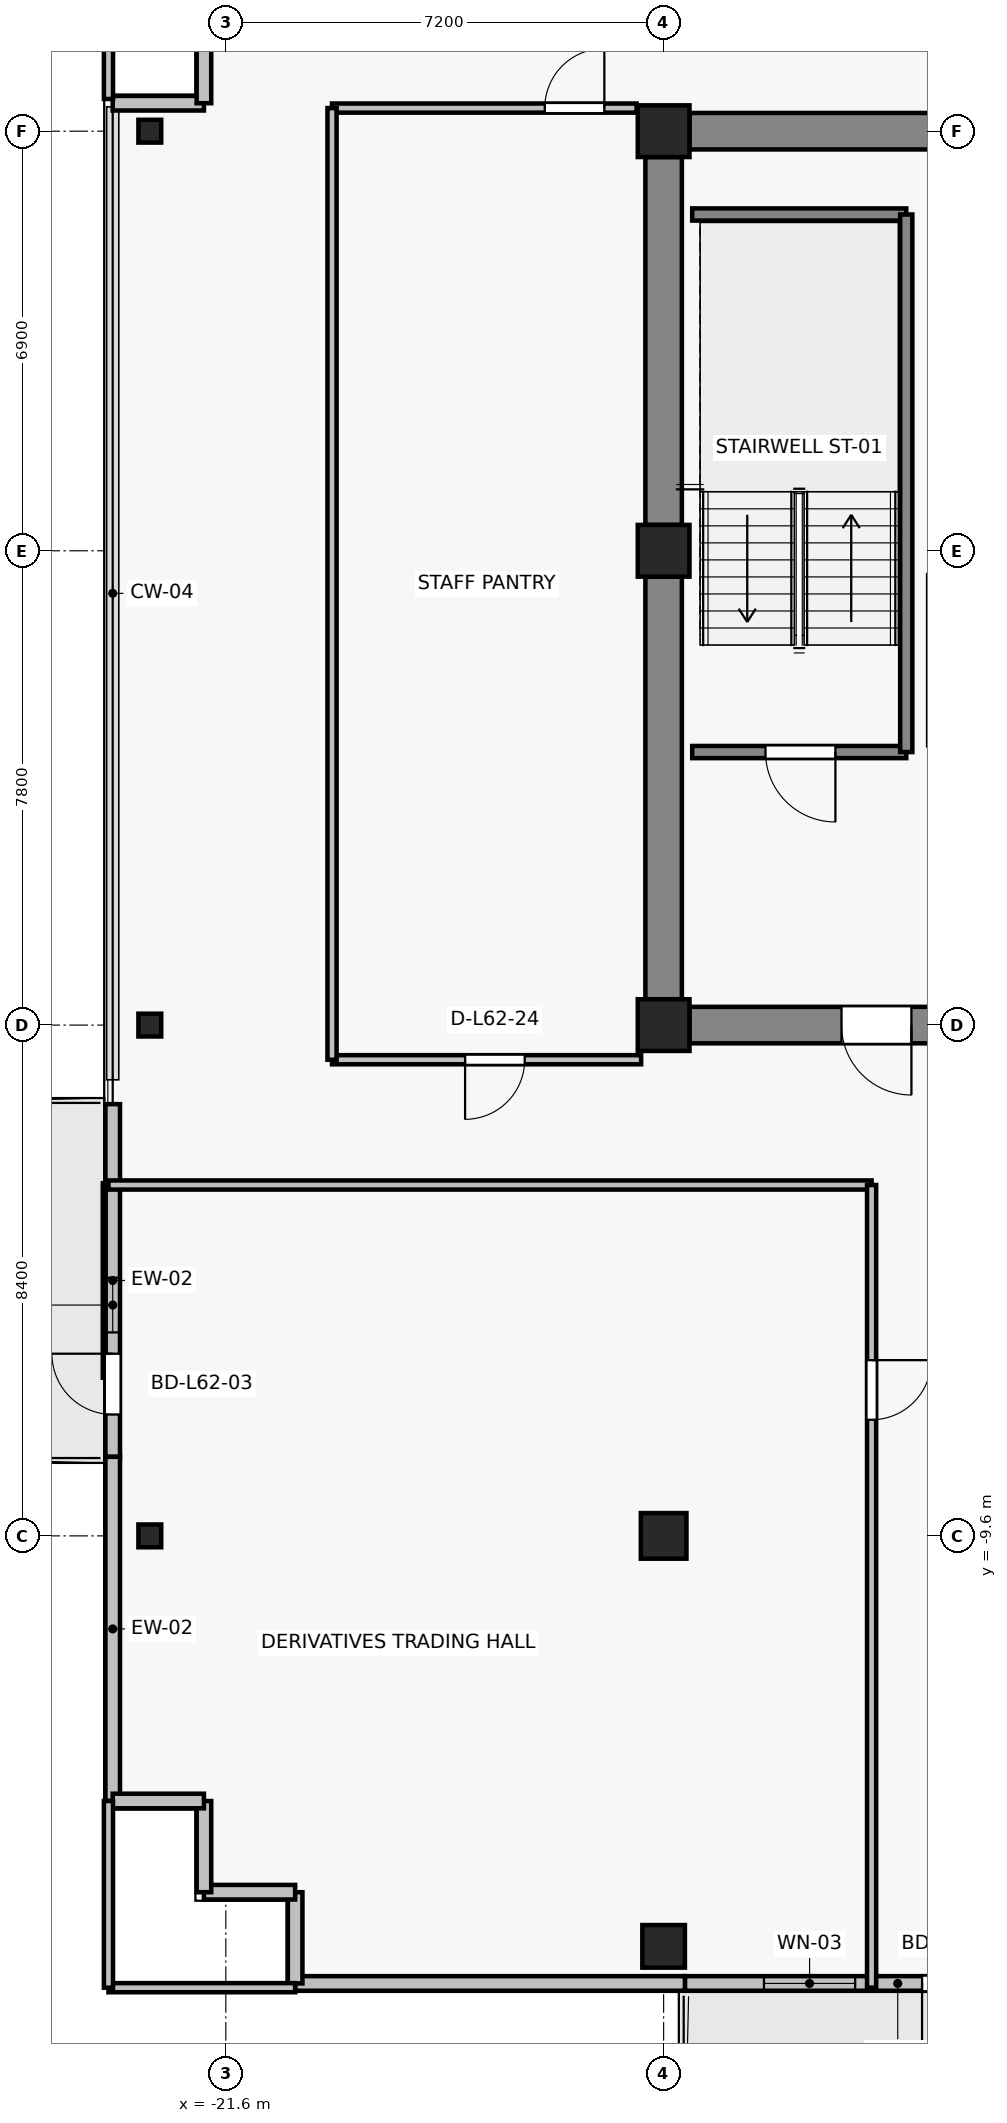
"""IFC4 building model, lengths in metres.
Left out: names, types, materials, properties, quantities, classifications, styles, units other than length and angle.
Written with IfcOpenShell. Run it as: python <this file> out.ifc"""

import sys

from ifc_helpers import new_model, si_unit, direction, frame, frame_2d, origin, origin_2d, place, context, subcontext, project, spatial, rectangle, i_section, extrude, source, transform, mapped, element, fill, save


model = new_model("IFC4")
c1 = context("Model", 3, precision=1e-05, world=origin(), true_north=direction((0.0, 1.0)))
c2 = subcontext(c1, "Body", "Model", "MODEL_VIEW")
j1 = project(units=[si_unit("LENGTHUNIT", "METRE"), si_unit("PLANEANGLEUNIT", "RADIAN")], contexts=[c1])
p1 = place(None, origin())
s1 = spatial("IfcSite", under=j1, at=p1, CompositionType="ELEMENT")
p2 = place(p1, origin())
s2 = spatial("IfcBuilding", under=s1, at=p2, CompositionType="ELEMENT")
p3 = place(p2, frame((0.0, 0.0, 222.1)))
s3 = spatial("IfcBuildingStorey", under=s2, at=p3, CompositionType="ELEMENT", Elevation=222.1)
for number, where, z_axis, x_axis in (
    (1, (-14.4, -1.2, 0.0), (0.0, 0.0, 1.0), (1.0, 0.0, 0.0)),
    (2, (-14.4, 6.6, 0.0), (0.0, 0.0, 1.0), (1.0, 0.0, 0.0)),
    (3, (-14.4, 13.5, 0.0), (0.0, 0.0, 1.0), (1.0, 0.0, 0.0)),
):
    element("IfcColumn", number, at=place(p3, frame(where, z_axis=z_axis, x_axis=x_axis)), inside=s3, PredefinedType="COLUMN", context=c2, shape_type="SweptSolid", body=[
        extrude(rectangle(XDim=0.85, YDim=0.85, at=origin_2d()), origin(), (0.0, 0.0, 1.0), 3.3),
    ])
p4 = place(p3, frame((-14.4, -9.6, 0.0), z_axis=(0.0, 0.0, 1.0), x_axis=(1.0, 0.0, 0.0)))
e4 = element("IfcColumn", 4, at=p4, inside=s3, PredefinedType="COLUMN", context=c2, shape_type="SweptSolid", body=[
    extrude(rectangle(XDim=0.75, YDim=0.75, at=origin_2d()), origin(), (0.0, 0.0, 1.0), 3.3),
])
p5 = place(p3, frame((-14.4, -16.35, 0.0), z_axis=(0.0, 0.0, 1.0), x_axis=(1.0, 0.0, 0.0)))
e5 = element("IfcColumn", 5, at=p5, inside=s3, PredefinedType="COLUMN", context=c2, shape_type="SweptSolid", body=[
    extrude(rectangle(XDim=0.7, YDim=0.7, at=origin_2d()), origin(), (0.0, 0.0, 1.0), 3.3),
])
for number, where, z_axis, x_axis in (
    (6, (-22.85, -9.6, 0.0), (0.0, 0.0, 1.0), (1.0, 0.0, 0.0)),
    (7, (-22.85, -1.2, 0.0), (0.0, 0.0, 1.0), (1.0, 0.0, 0.0)),
    (8, (-22.85, 13.5, 0.0), (0.0, 0.0, 1.0), (1.0, 0.0, 0.0)),
):
    element("IfcColumn", number, at=place(p3, frame(where, z_axis=z_axis, x_axis=x_axis)), inside=s3, PredefinedType="COLUMN", context=c2, shape_type="SweptSolid", body=[
        extrude(i_section(OverallWidth=0.375, OverallDepth=0.375, WebThickness=0.017, FlangeThickness=0.027, FilletRadius=0.015, at=origin_2d()), origin(), (0.0, 0.0, 1.0), 3.3),
    ])
p6 = place(p3, frame((-13.975, 13.5, 0.0), z_axis=(0.0, 0.0, 1.0), x_axis=(1.0, 0.0, 0.0)))
e9 = element("IfcWall", 9, at=p6, inside=s3, PredefinedType="SHEAR", context=c2, shape_type="SweptSolid", body=[
    extrude(rectangle(XDim=6.35, YDim=0.6, at=frame_2d((3.175, 0.0))), origin(), (0.0, 0.0, 1.0), 3.075),
])
p7 = place(p3, frame((-14.4, -0.775, 0.0), z_axis=(0.0, 0.0, 1.0), x_axis=(0.0, 1.0, 0.0)))
e10 = element("IfcWall", 10, at=p7, inside=s3, PredefinedType="SHEAR", context=c2, shape_type="SweptSolid", body=[
    extrude(rectangle(XDim=6.95, YDim=0.6, at=frame_2d((3.475, 0.0))), origin(), (0.0, 0.0, 1.0), 3.075),
])
p8 = place(p3, frame((-14.4, 7.025, 0.0), z_axis=(0.0, 0.0, 1.0), x_axis=(0.0, 1.0, 0.0)))
e11 = element("IfcWall", 11, at=p8, inside=s3, PredefinedType="SHEAR", context=c2, shape_type="SweptSolid", body=[
    extrude(rectangle(XDim=6.05, YDim=0.6, at=frame_2d((3.025, 0.0))), origin(), (0.0, 0.0, 1.0), 3.075),
])
p9 = place(p3, frame((-7.625, -1.2, 0.0), z_axis=(0.0, 0.0, 1.0), x_axis=(-1.0, 0.0, 0.0)))
e12 = element("IfcWall", 12, at=p9, inside=s3, PredefinedType="SHEAR", context=c2, shape_type="SweptSolid", body=[
    extrude(rectangle(XDim=6.35, YDim=0.6, at=frame_2d((3.175, 0.0))), origin(), (0.0, 0.0, 1.0), 3.075),
])
p10 = place(p9, frame((2.7, 0.0, 0.0)))
e13 = element("IfcOpeningElement", 13, at=p10, cuts=e12, PredefinedType="OPENING", context=c2, shape_type="SweptSolid", body=[
    extrude(rectangle(XDim=1.15, YDim=2.15, at=frame_2d((0.575, 1.075))), frame((0.0, 0.31, 0.0), z_axis=(0.0, -1.0, 0.0), x_axis=(1.0, 0.0, 0.0)), (0.0, 0.0, 1.0), 0.62),
])
p11 = place(p3, frame((-7.05, -16.96, 0.0), z_axis=(0.0, 0.0, 1.0), x_axis=(-1.0, 0.0, 0.0)))
e14 = element("IfcWall", 14, at=p11, inside=s3, PredefinedType="SOLIDWALL", context=c2, shape_type="SweptSolid", body=[
    extrude(rectangle(XDim=7.0, YDim=0.24, at=frame_2d((3.5, 0.0))), origin(), (0.0, 0.0, 1.0), 2.665),
])
p12 = place(p11, frame((2.1, 0.0, 0.0)))
e15 = element("IfcOpeningElement", 15, at=p12, cuts=e14, PredefinedType="OPENING", context=c2, shape_type="SweptSolid", body=[
    extrude(rectangle(XDim=1.0, YDim=2.2, at=frame_2d((0.5, 1.1))), frame((0.0, 0.13, 0.0), z_axis=(0.0, -1.0, 0.0), x_axis=(1.0, 0.0, 0.0)), (0.0, 0.0, 1.0), 0.26),
])
p13 = place(p11, frame((4.2, 0.0, 0.85)))
e16 = element("IfcOpeningElement", 16, at=p13, cuts=e14, PredefinedType="OPENING", context=c2, shape_type="SweptSolid", body=[
    extrude(rectangle(XDim=1.5, YDim=1.6, at=frame_2d((0.75, 0.8))), frame((0.0, 0.13, 0.0), z_axis=(0.0, -1.0, 0.0), x_axis=(1.0, 0.0, 0.0)), (0.0, 0.0, 1.0), 0.26),
])
p14 = place(p3, frame((-23.46, -8.3, 0.0), z_axis=(0.0, 0.0, 1.0), x_axis=(0.0, 1.0, 0.0)))
e17 = element("IfcWall", 17, at=p14, inside=s3, PredefinedType="SOLIDWALL", context=c2, shape_type="SweptSolid", body=[
    extrude(rectangle(XDim=5.8, YDim=0.24, at=frame_2d((2.9, 0.0))), origin(), (0.0, 0.0, 1.0), 3.075),
])
p15 = place(p14, frame((0.696, 0.0, 0.0)))
e18 = element("IfcOpeningElement", 18, at=p15, cuts=e17, PredefinedType="OPENING", context=c2, shape_type="SweptSolid", body=[
    extrude(rectangle(XDim=1.0, YDim=2.2, at=frame_2d((0.5, 1.1))), frame((0.0, 0.13, 0.0), z_axis=(0.0, -1.0, 0.0), x_axis=(1.0, 0.0, 0.0)), (0.0, 0.0, 1.0), 0.26),
])
p16 = place(p14, frame((2.046, 0.0, 0.85)))
e19 = element("IfcOpeningElement", 19, at=p16, cuts=e17, PredefinedType="OPENING", context=c2, shape_type="SweptSolid", body=[
    extrude(rectangle(XDim=0.9, YDim=1.35, at=frame_2d((0.45, 0.675))), frame((0.0, 0.13, 0.0), z_axis=(0.0, -1.0, 0.0), x_axis=(1.0, 0.0, 0.0)), (0.0, 0.0, 1.0), 0.26),
])
p17 = place(p3, frame((-23.46, -8.3, 0.0), z_axis=(0.0, 0.0, 1.0), x_axis=(0.0, -1.0, 0.0)))
e20 = element("IfcWall", 20, at=p17, inside=s3, PredefinedType="SOLIDWALL", context=c2, shape_type="SweptSolid", body=[
    extrude(rectangle(XDim=5.66, YDim=0.24, at=frame_2d((2.83, 0.0))), origin(), (0.0, 0.0, 1.0), 3.075),
])
for number, where, z_axis, x_axis in (
    (21, (-21.96, 13.96, 0.0), (0.0, 0.0, 1.0), (-1.0, 0.0, 0.0)),
    (22, (-21.96, 15.46, 0.0), (0.0, 0.0, 1.0), (0.0, -1.0, 0.0)),
):
    element("IfcWall", number, at=place(p3, frame(where, z_axis=z_axis, x_axis=x_axis)), inside=s3, PredefinedType="SOLIDWALL", context=c2, shape_type="SweptSolid", body=[
        extrude(rectangle(XDim=1.5, YDim=0.24, at=frame_2d((0.75, 0.0))), origin(), (0.0, 0.0, 1.0), 3.075),
    ])
p18 = place(p3, frame((-20.46, -16.96, 0.0), z_axis=(0.0, 0.0, 1.0), x_axis=(1.0, 0.0, 0.0)))
e23 = element("IfcWall", 23, at=p18, inside=s3, PredefinedType="SOLIDWALL", context=c2, shape_type="SweptSolid", body=[
    extrude(rectangle(XDim=6.41, YDim=0.24, at=frame_2d((3.205, 0.0))), origin(), (0.0, 0.0, 1.0), 3.075),
])
for number, where, z_axis, x_axis in (
    (24, (-20.46, -15.46, 0.0), (0.0, 0.0, 1.0), (0.0, -1.0, 0.0)),
    (25, (-21.96, -15.46, 0.0), (0.0, 0.0, 1.0), (1.0, 0.0, 0.0)),
    (26, (-21.96, -13.96, 0.0), (0.0, 0.0, 1.0), (0.0, -1.0, 0.0)),
    (27, (-23.46, -13.96, 0.0), (0.0, 0.0, 1.0), (1.0, 0.0, 0.0)),
):
    element("IfcWall", number, at=place(p3, frame(where, z_axis=z_axis, x_axis=x_axis)), inside=s3, PredefinedType="SOLIDWALL", context=c2, shape_type="SweptSolid", body=[
        extrude(rectangle(XDim=1.5, YDim=0.24, at=frame_2d((0.75, 0.0))), origin(), (0.0, 0.0, 1.0), 3.075),
    ])
p19 = place(p3, frame((-10.41, 3.29, 0.0), z_axis=(0.0, 0.0, 1.0), x_axis=(-1.0, 0.0, 0.0)))
e28 = element("IfcWall", 28, at=p19, inside=s3, PredefinedType="SOLIDWALL", context=c2, shape_type="SweptSolid", body=[
    extrude(rectangle(XDim=3.52, YDim=0.2, at=frame_2d((1.76, 0.0))), origin(), (0.0, 0.0, 1.0), 3.075),
])
p20 = place(p19, frame((1.165, 0.0, 0.0)))
e29 = element("IfcOpeningElement", 29, at=p20, cuts=e28, PredefinedType="OPENING", context=c2, shape_type="SweptSolid", body=[
    extrude(rectangle(XDim=1.15, YDim=2.15, at=frame_2d((0.575, 1.075))), frame((0.0, 0.11, 0.0), z_axis=(0.0, -1.0, 0.0), x_axis=(1.0, 0.0, 0.0)), (0.0, 0.0, 1.0), 0.22),
])
p21 = place(p3, frame((-13.93, 12.13, 0.0), z_axis=(0.0, 0.0, 1.0), x_axis=(1.0, 0.0, 0.0)))
e30 = element("IfcWall", 30, at=p21, inside=s3, PredefinedType="SOLIDWALL", context=c2, shape_type="SweptSolid", body=[
    extrude(rectangle(XDim=3.52, YDim=0.2, at=frame_2d((1.76, 0.0))), origin(), (0.0, 0.0, 1.0), 3.075),
])
p22 = place(p3, frame((-10.41, 12.13, 0.0), z_axis=(0.0, 0.0, 1.0), x_axis=(0.0, -1.0, 0.0)))
e31 = element("IfcWall", 31, at=p22, inside=s3, PredefinedType="SOLIDWALL", context=c2, shape_type="SweptSolid", body=[
    extrude(rectangle(XDim=8.84, YDim=0.2, at=frame_2d((4.42, 0.0))), origin(), (0.0, 0.0, 1.0), 3.075),
])
p23 = place(p3, frame((-20.46, -17.03, 0.0), z_axis=(0.0, 0.0, 1.0), x_axis=(-1.0, 0.0, 0.0)))
e32 = element("IfcWall", 32, at=p23, inside=s3, PredefinedType="PARTITIONING", context=c2, shape_type="SweptSolid", body=[
    extrude(rectangle(XDim=3.07, YDim=0.15, at=frame_2d((1.535, 0.0))), origin(), (0.0, 0.0, 1.0), 2.665),
])
p24 = place(p3, frame((-23.53, -3.83, 0.0), z_axis=(0.0, 0.0, 1.0), x_axis=(1.0, 0.0, 0.0)))
e33 = element("IfcWall", 33, at=p24, inside=s3, PredefinedType="PARTITIONING", context=c2, shape_type="SweptSolid", body=[
    extrude(rectangle(XDim=12.55, YDim=0.15, at=frame_2d((6.275, 0.0))), origin(), (0.0, 0.0, 1.0), 2.615),
])
p25 = place(p3, frame((-23.53, -17.03, 0.0), z_axis=(0.0, 0.0, 1.0), x_axis=(0.0, 1.0, 0.0)))
e34 = element("IfcWall", 34, at=p25, inside=s3, PredefinedType="PARTITIONING", context=c2, shape_type="SweptSolid", body=[
    extrude(rectangle(XDim=3.07, YDim=0.15, at=frame_2d((1.535, 0.0))), origin(), (0.0, 0.0, 1.0), 3.075),
])
p26 = place(p3, frame((-10.98, -3.83, 0.0), z_axis=(0.0, 0.0, 1.0), x_axis=(0.0, -1.0, 0.0)))
e35 = element("IfcWall", 35, at=p26, inside=s3, PredefinedType="PARTITIONING", context=c2, shape_type="SweptSolid", body=[
    extrude(rectangle(XDim=13.2, YDim=0.15, at=frame_2d((6.6, 0.0))), origin(), (0.0, 0.0, 1.0), 2.615),
])
p27 = place(p26, frame((2.88, 0.0, 0.0)))
e36 = element("IfcOpeningElement", 36, at=p27, cuts=e35, PredefinedType="OPENING", context=c2, shape_type="SweptSolid", body=[
    extrude(rectangle(XDim=0.98, YDim=2.15, at=frame_2d((0.49, 1.075))), frame((0.0, 0.085, 0.0), z_axis=(0.0, -1.0, 0.0), x_axis=(1.0, 0.0, 0.0)), (0.0, 0.0, 1.0), 0.17),
])
p28 = place(p3, frame((-14.77, -1.77, 0.0), z_axis=(0.0, 0.0, 1.0), x_axis=(-1.0, 0.0, 0.0)))
e37 = element("IfcWall", 37, at=p28, inside=s3, PredefinedType="PARTITIONING", context=c2, shape_type="SweptSolid", body=[
    extrude(rectangle(XDim=5.083, YDim=0.15, at=frame_2d((2.542, 0.0))), origin(), (0.0, 0.0, 1.0), 3.075),
])
p29 = place(p28, frame((1.915, 0.0, 0.0)))
e38 = element("IfcOpeningElement", 38, at=p29, cuts=e37, PredefinedType="OPENING", context=c2, shape_type="SweptSolid", body=[
    extrude(rectangle(XDim=0.98, YDim=2.15, at=frame_2d((0.49, 1.075))), frame((0.0, 0.085, 0.0), z_axis=(0.0, -1.0, 0.0), x_axis=(1.0, 0.0, 0.0)), (0.0, 0.0, 1.0), 0.17),
])
p30 = place(p3, frame((-19.853, 13.88, 0.0), z_axis=(0.0, 0.0, 1.0), x_axis=(1.0, 0.0, 0.0)))
e39 = element("IfcWall", 39, at=p30, inside=s3, PredefinedType="PARTITIONING", context=c2, shape_type="SweptSolid", body=[
    extrude(rectangle(XDim=5.008, YDim=0.15, at=frame_2d((2.504, 0.0))), origin(), (0.0, 0.0, 1.0), 3.075),
])
p31 = place(p30, frame((3.498, 0.0, 0.0)))
e40 = element("IfcOpeningElement", 40, at=p31, cuts=e39, PredefinedType="OPENING", context=c2, shape_type="SweptSolid", body=[
    extrude(rectangle(XDim=0.98, YDim=2.15, at=frame_2d((0.49, 1.075))), frame((0.0, 0.085, 0.0), z_axis=(0.0, -1.0, 0.0), x_axis=(1.0, 0.0, 0.0)), (0.0, 0.0, 1.0), 0.17),
])
p32 = place(p3, frame((-19.853, -1.77, 0.0), z_axis=(0.0, 0.0, 1.0), x_axis=(0.0, 1.0, 0.0)))
e41 = element("IfcWall", 41, at=p32, inside=s3, PredefinedType="PARTITIONING", context=c2, shape_type="SweptSolid", body=[
    extrude(rectangle(XDim=15.65, YDim=0.15, at=frame_2d((7.825, 0.0))), origin(), (0.0, 0.0, 1.0), 2.615),
])
p33 = place(p3, frame((-23.53, 14.03, 0.0), z_axis=(0.0, 0.0, 1.0), x_axis=(0.0, 1.0, 0.0)))
e42 = element("IfcWall", 42, at=p33, inside=s3, PredefinedType="PARTITIONING", context=c2, shape_type="SweptSolid", body=[
    extrude(rectangle(XDim=3.0, YDim=0.15, at=frame_2d((1.5, 0.0))), origin(), (0.0, 0.0, 1.0), 3.075),
])
m1 = source(origin(), c2, "Body", "SweptSolid", [
    extrude(rectangle(XDim=1.0, YDim=2.2, at=frame_2d((0.5, 1.1))), frame((0.0, 0.025, 0.0), z_axis=(0.0, -1.0, 0.0), x_axis=(1.0, 0.0, 0.0)), (0.0, 0.0, 1.0), 0.05),
])
p34 = place(p12, origin())
e43 = element("IfcDoor", 43, at=p34, inside=s3, OperationType="SINGLE_SWING_RIGHT", PredefinedType="DOOR", context=c2, shape_type="MappedRepresentation", body=[
    mapped(m1, transform((0.0, 0.0, 0.0), x_axis=(1.0, 0.0, 0.0), y_axis=(0.0, 1.0, 0.0), z_axis=(0.0, 0.0, 1.0), scale=1.0)),
])
fill(e15, e43)
m2 = source(origin(), c2, "Body", "SweptSolid", [
    extrude(rectangle(XDim=1.5, YDim=1.6, at=frame_2d((0.75, 0.8))), frame((0.0, 0.03, 0.0), z_axis=(0.0, -1.0, 0.0), x_axis=(1.0, 0.0, 0.0)), (0.0, 0.0, 1.0), 0.06),
])
p35 = place(p13, origin())
e44 = element("IfcWindow", 44, at=p35, inside=s3, PartitioningType="SINGLE_PANEL", PredefinedType="WINDOW", context=c2, shape_type="MappedRepresentation", body=[
    mapped(m2, transform((0.0, 0.0, 0.0), x_axis=(1.0, 0.0, 0.0), y_axis=(0.0, 1.0, 0.0), z_axis=(0.0, 0.0, 1.0), scale=1.0)),
])
fill(e16, e44)
p36 = place(p15, origin())
e45 = element("IfcDoor", 45, at=p36, inside=s3, OperationType="SINGLE_SWING_RIGHT", PredefinedType="DOOR", context=c2, shape_type="MappedRepresentation", body=[
    mapped(m1, transform((0.0, 0.0, 0.0), x_axis=(1.0, 0.0, 0.0), y_axis=(0.0, 1.0, 0.0), z_axis=(0.0, 0.0, 1.0), scale=1.0)),
])
fill(e18, e45)
m3 = source(origin(), c2, "Body", "SweptSolid", [
    extrude(rectangle(XDim=0.9, YDim=1.35, at=frame_2d((0.45, 0.675))), frame((0.0, 0.03, 0.0), z_axis=(0.0, -1.0, 0.0), x_axis=(1.0, 0.0, 0.0)), (0.0, 0.0, 1.0), 0.06),
])
p37 = place(p16, origin())
e46 = element("IfcWindow", 46, at=p37, inside=s3, PartitioningType="SINGLE_PANEL", PredefinedType="WINDOW", context=c2, shape_type="MappedRepresentation", body=[
    mapped(m3, transform((0.0, 0.0, 0.0), x_axis=(1.0, 0.0, 0.0), y_axis=(0.0, 1.0, 0.0), z_axis=(0.0, 0.0, 1.0), scale=1.0)),
])
fill(e19, e46)
m4 = source(origin(), c2, "Body", "SweptSolid", [
    extrude(rectangle(XDim=1.15, YDim=2.15, at=frame_2d((0.575, 1.075))), frame((0.0, 0.025, 0.0), z_axis=(0.0, -1.0, 0.0), x_axis=(1.0, 0.0, 0.0)), (0.0, 0.0, 1.0), 0.05),
])
p38 = place(p20, origin())
e47 = element("IfcDoor", 47, at=p38, inside=s3, OperationType="SINGLE_SWING_LEFT", PredefinedType="DOOR", context=c2, shape_type="MappedRepresentation", body=[
    mapped(m4, transform((0.0, 0.0, 0.0), x_axis=(1.0, 0.0, 0.0), y_axis=(0.0, 1.0, 0.0), z_axis=(0.0, 0.0, 1.0), scale=1.0)),
])
fill(e29, e47)
p39 = place(p10, origin())
e48 = element("IfcDoor", 48, at=p39, inside=s3, OperationType="SINGLE_SWING_LEFT", PredefinedType="DOOR", context=c2, shape_type="MappedRepresentation", body=[
    mapped(m4, transform((0.0, 0.0, 0.0), x_axis=(1.0, 0.0, 0.0), y_axis=(0.0, 1.0, 0.0), z_axis=(0.0, 0.0, 1.0), scale=1.0)),
])
fill(e13, e48)
m5 = source(origin(), c2, "Body", "SweptSolid", [
    extrude(rectangle(XDim=0.98, YDim=2.15, at=frame_2d((0.49, 1.075))), frame((0.0, 0.025, 0.0), z_axis=(0.0, -1.0, 0.0), x_axis=(1.0, 0.0, 0.0)), (0.0, 0.0, 1.0), 0.05),
])
p40 = place(p27, origin())
e49 = element("IfcDoor", 49, at=p40, inside=s3, OperationType="SINGLE_SWING_LEFT", PredefinedType="DOOR", context=c2, shape_type="MappedRepresentation", body=[
    mapped(m5, transform((0.0, 0.0, 0.0), x_axis=(1.0, 0.0, 0.0), y_axis=(0.0, 1.0, 0.0), z_axis=(0.0, 0.0, 1.0), scale=1.0)),
])
fill(e36, e49)
p41 = place(p29, origin())
e50 = element("IfcDoor", 50, at=p41, inside=s3, OperationType="SINGLE_SWING_RIGHT", PredefinedType="DOOR", context=c2, shape_type="MappedRepresentation", body=[
    mapped(m5, transform((0.0, 0.0, 0.0), x_axis=(1.0, 0.0, 0.0), y_axis=(0.0, 1.0, 0.0), z_axis=(0.0, 0.0, 1.0), scale=1.0)),
])
fill(e38, e50)
p42 = place(p31, origin())
e51 = element("IfcDoor", 51, at=p42, inside=s3, OperationType="SINGLE_SWING_RIGHT", PredefinedType="DOOR", context=c2, shape_type="MappedRepresentation", body=[
    mapped(m5, transform((0.0, 0.0, 0.0), x_axis=(1.0, 0.0, 0.0), y_axis=(0.0, 1.0, 0.0), z_axis=(0.0, 0.0, 1.0), scale=1.0)),
])
fill(e40, e51)
save(model, sys.argv[1])
